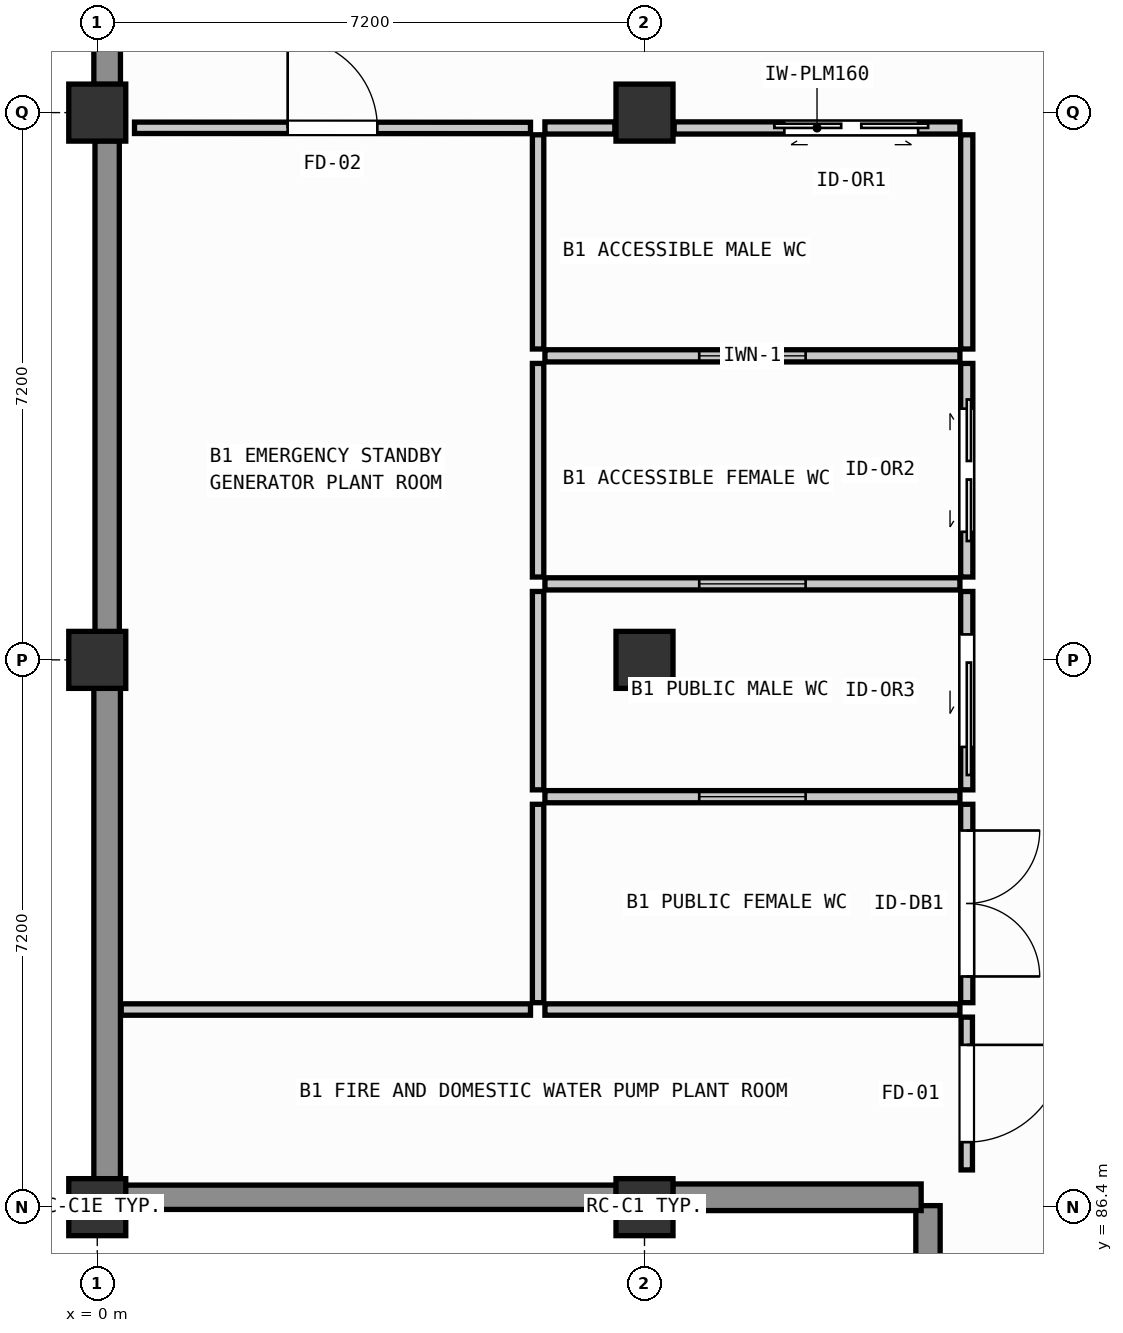
"""IFC4 building model, lengths in metres.
Left out: names, types, materials, properties, quantities, classifications, styles, units other than length and angle.
Written with IfcOpenShell. Run it as: python <this file> out.ifc"""

import sys

from ifc_helpers import new_model, si_unit, direction, frame, frame_2d, origin, origin_2d, place, context, subcontext, project, spatial, rectangle, extrude, element, fill, save


model = new_model("IFC4")
c1 = context("Model", 3, precision=1e-05, world=origin(), true_north=direction((0.0, 1.0)))
c2 = subcontext(c1, "Body", "Model", "MODEL_VIEW")
j1 = project(units=[si_unit("LENGTHUNIT", "METRE"), si_unit("PLANEANGLEUNIT", "RADIAN")], contexts=[c1])
p1 = place(None, origin())
s1 = spatial("IfcSite", under=j1, at=p1, CompositionType="ELEMENT")
p2 = place(p1, origin())
s2 = spatial("IfcBuilding", under=s1, at=p2, CompositionType="ELEMENT")
p3 = place(p2, frame((0.0, 0.0, -4.5)))
s3 = spatial("IfcBuildingStorey", under=s2, at=p3, CompositionType="ELEMENT", Elevation=-4.5)
for number, where, z_axis, x_axis in (
    (1, (0.0, 86.4, -0.5), (0.0, 0.0, 1.0), (1.0, 0.0, 0.0)),
    (2, (0.0, 93.6, -0.5), (0.0, 0.0, 1.0), (1.0, 0.0, 0.0)),
    (3, (0.0, 100.8, -0.5), (0.0, 0.0, 1.0), (1.0, 0.0, 0.0)),
    (4, (7.2, 86.4, -0.5), (0.0, 0.0, 1.0), (1.0, 0.0, 0.0)),
    (5, (7.2, 93.6, -0.5), (0.0, 0.0, 1.0), (1.0, 0.0, 0.0)),
    (6, (7.2, 100.8, -0.5), (0.0, 0.0, 1.0), (1.0, 0.0, 0.0)),
):
    element("IfcColumn", number, at=place(p3, frame(where, z_axis=z_axis, x_axis=x_axis)), inside=s3, PredefinedType="COLUMN", context=c2, shape_type="SweptSolid", body=[
        extrude(rectangle(XDim=0.75, YDim=0.75, at=origin_2d()), origin(), (0.0, 0.0, 1.0), 4.75),
    ])
p4 = place(p3, frame((10.93, 84.18, 0.0), z_axis=(0.0, 0.0, 1.0), x_axis=(0.0, 1.0, 0.0)))
e7 = element("IfcWall", 7, at=p4, inside=s3, PredefinedType="SOLIDWALL", context=c2, shape_type="SweptSolid", body=[
    extrude(rectangle(XDim=2.24, YDim=0.32, at=frame_2d((1.12, 0.0))), origin(), (0.0, 0.0, 1.0), 4.25),
])
p5 = place(p3, frame((10.84, 86.53, 0.0), z_axis=(0.0, 0.0, 1.0), x_axis=(-1.0, 0.0, 0.0)))
e8 = element("IfcWall", 8, at=p5, inside=s3, PredefinedType="SOLIDWALL", context=c2, shape_type="SweptSolid", body=[
    extrude(rectangle(XDim=3.27, YDim=0.35, at=frame_2d((1.635, 0.0))), origin(), (0.0, 0.0, 1.0), 4.25),
])
p6 = place(p3, frame((6.83, 86.53, 0.0), z_axis=(0.0, 0.0, 1.0), x_axis=(-1.0, 0.0, 0.0)))
e9 = element("IfcWall", 9, at=p6, inside=s3, PredefinedType="SOLIDWALL", context=c2, shape_type="SweptSolid", body=[
    extrude(rectangle(XDim=6.46, YDim=0.32, at=frame_2d((3.23, 0.0))), origin(), (0.0, 0.0, 1.0), 4.25),
])
p7 = place(p3, frame((0.13, 86.77, 0.0), z_axis=(0.0, 0.0, 1.0), x_axis=(0.0, 1.0, 0.0)))
e10 = element("IfcWall", 10, at=p7, inside=s3, PredefinedType="SOLIDWALL", context=c2, shape_type="SweptSolid", body=[
    extrude(rectangle(XDim=6.46, YDim=0.35, at=frame_2d((3.23, 0.0))), origin(), (0.0, 0.0, 1.0), 4.25),
])
p8 = place(p3, frame((0.13, 93.97, 0.0), z_axis=(0.0, 0.0, 1.0), x_axis=(0.0, 1.0, 0.0)))
e11 = element("IfcWall", 11, at=p8, inside=s3, PredefinedType="SOLIDWALL", context=c2, shape_type="SweptSolid", body=[
    extrude(rectangle(XDim=6.46, YDim=0.32, at=frame_2d((3.23, 0.0))), origin(), (0.0, 0.0, 1.0), 4.25),
])
p9 = place(p3, frame((0.13, 101.17, 0.0), z_axis=(0.0, 0.0, 1.0), x_axis=(0.0, 1.0, 0.0)))
e12 = element("IfcWall", 12, at=p9, inside=s3, PredefinedType="SOLIDWALL", context=c2, shape_type="SweptSolid", body=[
    extrude(rectangle(XDim=6.46, YDim=0.35, at=frame_2d((3.23, 0.0))), origin(), (0.0, 0.0, 1.0), 4.25),
])
p10 = place(p3, frame((5.89, 100.598, 0.0), z_axis=(0.0, 0.0, 1.0), x_axis=(1.0, 0.0, 0.0)))
e13 = element("IfcWall", 13, at=p10, inside=s3, PredefinedType="PLUMBINGWALL", context=c2, shape_type="SweptSolid", body=[
    extrude(rectangle(XDim=0.92, YDim=0.16, at=frame_2d((0.46, 0.0))), origin(), (0.0, 0.0, 1.0), 3.4),
])
p11 = place(p3, frame((7.59, 100.598, 0.0), z_axis=(0.0, 0.0, 1.0), x_axis=(1.0, 0.0, 0.0)))
e14 = element("IfcWall", 14, at=p11, inside=s3, PredefinedType="PLUMBINGWALL", context=c2, shape_type="SweptSolid", body=[
    extrude(rectangle(XDim=3.76, YDim=0.16, at=frame_2d((1.88, 0.0))), origin(), (0.0, 0.0, 1.0), 3.4),
])
p12 = place(p11, frame((1.45, 0.0, 0.0)))
e15 = element("IfcOpeningElement", 15, at=p12, cuts=e14, PredefinedType="OPENING", context=c2, shape_type="SweptSolid", body=[
    extrude(rectangle(XDim=1.76, YDim=2.38, at=frame_2d((0.88, 1.19))), frame((0.0, 0.09, 0.0), z_axis=(0.0, -1.0, 0.0), x_axis=(1.0, 0.0, 0.0)), (0.0, 0.0, 1.0), 0.18),
])
p13 = place(p3, frame((11.44, 100.508, 0.0), z_axis=(0.0, 0.0, 1.0), x_axis=(0.0, -1.0, 0.0)))
e16 = element("IfcWall", 16, at=p13, inside=s3, PredefinedType="PLUMBINGWALL", context=c2, shape_type="SweptSolid", body=[
    extrude(rectangle(XDim=2.818, YDim=0.16, at=frame_2d((1.409, 0.0))), origin(), (0.0, 0.0, 1.0), 3.4),
])
p14 = place(p3, frame((11.35, 97.6, 0.0), z_axis=(0.0, 0.0, 1.0), x_axis=(-1.0, 0.0, 0.0)))
e17 = element("IfcWall", 17, at=p14, inside=s3, PredefinedType="PLUMBINGWALL", context=c2, shape_type="SweptSolid", body=[
    extrude(rectangle(XDim=5.46, YDim=0.16, at=frame_2d((2.73, 0.0))), origin(), (0.0, 0.0, 1.0), 3.55),
])
p15 = place(p14, frame((2.03, 0.0, 1.15)))
e18 = element("IfcOpeningElement", 18, at=p15, cuts=e17, PredefinedType="OPENING", context=c2, shape_type="SweptSolid", body=[
    extrude(rectangle(XDim=1.4, YDim=1.05, at=frame_2d((0.7, 0.525))), frame((0.0, 0.09, 0.0), z_axis=(0.0, -1.0, 0.0), x_axis=(1.0, 0.0, 0.0)), (0.0, 0.0, 1.0), 0.18),
])
p16 = place(p3, frame((5.8, 97.69, 0.0), z_axis=(0.0, 0.0, 1.0), x_axis=(0.0, 1.0, 0.0)))
e19 = element("IfcWall", 19, at=p16, inside=s3, PredefinedType="PARTITIONING", context=c2, shape_type="SweptSolid", body=[
    extrude(rectangle(XDim=2.818, YDim=0.15, at=frame_2d((1.409, 0.0))), origin(), (0.0, 0.0, 1.0), 3.4),
])
p17 = place(p3, frame((11.44, 97.5, 0.0), z_axis=(0.0, 0.0, 1.0), x_axis=(0.0, -1.0, 0.0)))
e20 = element("IfcWall", 20, at=p17, inside=s3, PredefinedType="PLUMBINGWALL", context=c2, shape_type="SweptSolid", body=[
    extrude(rectangle(XDim=2.81, YDim=0.16, at=frame_2d((1.405, 0.0))), origin(), (0.0, 0.0, 1.0), 4.27),
])
p18 = place(p17, frame((0.595, 0.0, 0.0)))
e21 = element("IfcOpeningElement", 21, at=p18, cuts=e20, PredefinedType="OPENING", context=c2, shape_type="SweptSolid", body=[
    extrude(rectangle(XDim=1.62, YDim=2.34, at=frame_2d((0.81, 1.17))), frame((0.0, 0.09, 0.0), z_axis=(0.0, -1.0, 0.0), x_axis=(1.0, 0.0, 0.0)), (0.0, 0.0, 1.0), 0.18),
])
p19 = place(p3, frame((11.35, 94.6, 0.0), z_axis=(0.0, 0.0, 1.0), x_axis=(-1.0, 0.0, 0.0)))
e22 = element("IfcWall", 22, at=p19, inside=s3, PredefinedType="PLUMBINGWALL", context=c2, shape_type="SweptSolid", body=[
    extrude(rectangle(XDim=5.46, YDim=0.16, at=frame_2d((2.73, 0.0))), origin(), (0.0, 0.0, 1.0), 3.55),
])
p20 = place(p19, frame((2.03, 0.0, 1.15)))
e23 = element("IfcOpeningElement", 23, at=p20, cuts=e22, PredefinedType="OPENING", context=c2, shape_type="SweptSolid", body=[
    extrude(rectangle(XDim=1.4, YDim=1.05, at=frame_2d((0.7, 0.525))), frame((0.0, 0.09, 0.0), z_axis=(0.0, -1.0, 0.0), x_axis=(1.0, 0.0, 0.0)), (0.0, 0.0, 1.0), 0.18),
])
p21 = place(p3, frame((5.8, 94.69, 0.0), z_axis=(0.0, 0.0, 1.0), x_axis=(0.0, 1.0, 0.0)))
e24 = element("IfcWall", 24, at=p21, inside=s3, PredefinedType="PARTITIONING", context=c2, shape_type="SweptSolid", body=[
    extrude(rectangle(XDim=2.81, YDim=0.15, at=frame_2d((1.405, 0.0))), origin(), (0.0, 0.0, 1.0), 4.27),
])
p22 = place(p3, frame((11.44, 94.5, 0.0), z_axis=(0.0, 0.0, 1.0), x_axis=(0.0, -1.0, 0.0)))
e25 = element("IfcWall", 25, at=p22, inside=s3, PredefinedType="PLUMBINGWALL", context=c2, shape_type="SweptSolid", body=[
    extrude(rectangle(XDim=2.61, YDim=0.16, at=frame_2d((1.305, 0.0))), origin(), (0.0, 0.0, 1.0), 3.4),
])
p23 = place(p22, frame((0.565, 0.0, 0.0)))
e26 = element("IfcOpeningElement", 26, at=p23, cuts=e25, PredefinedType="OPENING", context=c2, shape_type="SweptSolid", body=[
    extrude(rectangle(XDim=1.48, YDim=2.3, at=frame_2d((0.74, 1.15))), frame((0.0, 0.09, 0.0), z_axis=(0.0, -1.0, 0.0), x_axis=(1.0, 0.0, 0.0)), (0.0, 0.0, 1.0), 0.18),
])
p24 = place(p3, frame((11.35, 91.8, 0.0), z_axis=(0.0, 0.0, 1.0), x_axis=(-1.0, 0.0, 0.0)))
e27 = element("IfcWall", 27, at=p24, inside=s3, PredefinedType="PLUMBINGWALL", context=c2, shape_type="SweptSolid", body=[
    extrude(rectangle(XDim=5.46, YDim=0.16, at=frame_2d((2.73, 0.0))), origin(), (0.0, 0.0, 1.0), 3.55),
])
p25 = place(p24, frame((2.03, 0.0, 1.15)))
e28 = element("IfcOpeningElement", 28, at=p25, cuts=e27, PredefinedType="OPENING", context=c2, shape_type="SweptSolid", body=[
    extrude(rectangle(XDim=1.4, YDim=1.05, at=frame_2d((0.7, 0.525))), frame((0.0, 0.09, 0.0), z_axis=(0.0, -1.0, 0.0), x_axis=(1.0, 0.0, 0.0)), (0.0, 0.0, 1.0), 0.18),
])
p26 = place(p3, frame((5.8, 91.89, 0.0), z_axis=(0.0, 0.0, 1.0), x_axis=(0.0, 1.0, 0.0)))
e29 = element("IfcWall", 29, at=p26, inside=s3, PredefinedType="PARTITIONING", context=c2, shape_type="SweptSolid", body=[
    extrude(rectangle(XDim=2.61, YDim=0.15, at=frame_2d((1.305, 0.0))), origin(), (0.0, 0.0, 1.0), 3.4),
])
p27 = place(p3, frame((11.44, 91.7, 0.0), z_axis=(0.0, 0.0, 1.0), x_axis=(0.0, -1.0, 0.0)))
e30 = element("IfcWall", 30, at=p27, inside=s3, PredefinedType="PLUMBINGWALL", context=c2, shape_type="SweptSolid", body=[
    extrude(rectangle(XDim=2.61, YDim=0.16, at=frame_2d((1.305, 0.0))), origin(), (0.0, 0.0, 1.0), 4.27),
])
p28 = place(p27, frame((0.345, 0.0, 0.0)))
e31 = element("IfcOpeningElement", 31, at=p28, cuts=e30, PredefinedType="OPENING", context=c2, shape_type="SweptSolid", body=[
    extrude(rectangle(XDim=1.92, YDim=2.36, at=frame_2d((0.96, 1.18))), frame((0.0, 0.09, 0.0), z_axis=(0.0, -1.0, 0.0), x_axis=(1.0, 0.0, 0.0)), (0.0, 0.0, 1.0), 0.18),
])
p29 = place(p3, frame((11.35, 89.0, 0.0), z_axis=(0.0, 0.0, 1.0), x_axis=(-1.0, 0.0, 0.0)))
e32 = element("IfcWall", 32, at=p29, inside=s3, PredefinedType="PARTITIONING", context=c2, shape_type="SweptSolid", body=[
    extrude(rectangle(XDim=5.46, YDim=0.15, at=frame_2d((2.73, 0.0))), origin(), (0.0, 0.0, 1.0), 3.55),
])
p30 = place(p3, frame((5.8, 89.09, 0.0), z_axis=(0.0, 0.0, 1.0), x_axis=(0.0, 1.0, 0.0)))
e33 = element("IfcWall", 33, at=p30, inside=s3, PredefinedType="PARTITIONING", context=c2, shape_type="SweptSolid", body=[
    extrude(rectangle(XDim=2.61, YDim=0.15, at=frame_2d((1.305, 0.0))), origin(), (0.0, 0.0, 1.0), 4.27),
])
p31 = place(p3, frame((11.44, 88.9, 0.0), z_axis=(0.0, 0.0, 1.0), x_axis=(0.0, -1.0, 0.0)))
e34 = element("IfcWall", 34, at=p31, inside=s3, PredefinedType="PARTITIONING", context=c2, shape_type="SweptSolid", body=[
    extrude(rectangle(XDim=2.01, YDim=0.15, at=frame_2d((1.005, 0.0))), origin(), (0.0, 0.0, 1.0), 4.27),
])
p32 = place(p31, frame((0.365, 0.0, 0.0)))
e35 = element("IfcOpeningElement", 35, at=p32, cuts=e34, PredefinedType="OPENING", context=c2, shape_type="SweptSolid", body=[
    extrude(rectangle(XDim=1.28, YDim=2.18, at=frame_2d((0.64, 1.09))), frame((0.0, 0.085, 0.0), z_axis=(0.0, -1.0, 0.0), x_axis=(1.0, 0.0, 0.0)), (0.0, 0.0, 1.0), 0.17),
])
p33 = place(p3, frame((0.49, 100.6, 0.0), z_axis=(0.0, 0.0, 1.0), x_axis=(0.999999911066, -0.000421743168, 0.0)))
e36 = element("IfcWall", 36, at=p33, inside=s3, PredefinedType="PARTITIONING", context=c2, shape_type="SweptSolid", body=[
    extrude(rectangle(XDim=5.21, YDim=0.15, at=frame_2d((2.605, 0.0))), origin(), (0.0, 0.0, 1.0), 3.4),
])
p34 = place(p33, frame((2.015, 0.0, 0.0)))
e37 = element("IfcOpeningElement", 37, at=p34, cuts=e36, PredefinedType="OPENING", context=c2, shape_type="SweptSolid", body=[
    extrude(rectangle(XDim=1.18, YDim=2.16, at=frame_2d((0.59, 1.08))), frame((0.0, 0.085, 0.0), z_axis=(0.0, -1.0, 0.0), x_axis=(1.0, 0.0, 0.0)), (0.0, 0.0, 1.0), 0.17),
])
p35 = place(p3, frame((5.7, 89.0, 0.0), z_axis=(0.0, 0.0, 1.0), x_axis=(-1.0, 0.0, 0.0)))
e38 = element("IfcWall", 38, at=p35, inside=s3, PredefinedType="PARTITIONING", context=c2, shape_type="SweptSolid", body=[
    extrude(rectangle(XDim=5.385, YDim=0.15, at=frame_2d((2.692, 0.0))), origin(), (0.0, 0.0, 1.0), 3.55),
])
p36 = place(p12, origin())
e39 = element("IfcDoor", 39, at=p36, inside=s3, OperationType="DOUBLE_DOOR_SLIDING", PredefinedType="DOOR", context=c2, shape_type="SweptSolid", body=[
    extrude(rectangle(XDim=1.76, YDim=2.38, at=frame_2d((0.88, 1.19))), frame((0.0, 0.025, 0.0), z_axis=(0.0, -1.0, 0.0), x_axis=(1.0, 0.0, 0.0)), (0.0, 0.0, 1.0), 0.05),
])
fill(e15, e39)
p37 = place(p15, origin())
e40 = element("IfcWindow", 40, at=p37, inside=s3, PartitioningType="SINGLE_PANEL", PredefinedType="WINDOW", context=c2, shape_type="SweptSolid", body=[
    extrude(rectangle(XDim=1.4, YDim=1.05, at=frame_2d((0.7, 0.525))), frame((0.0, 0.03, 0.0), z_axis=(0.0, -1.0, 0.0), x_axis=(1.0, 0.0, 0.0)), (0.0, 0.0, 1.0), 0.06),
])
fill(e18, e40)
p38 = place(p18, origin())
e41 = element("IfcDoor", 41, at=p38, inside=s3, OperationType="DOUBLE_DOOR_SLIDING", PredefinedType="DOOR", context=c2, shape_type="SweptSolid", body=[
    extrude(rectangle(XDim=1.62, YDim=2.34, at=frame_2d((0.81, 1.17))), frame((0.0, 0.025, 0.0), z_axis=(0.0, -1.0, 0.0), x_axis=(1.0, 0.0, 0.0)), (0.0, 0.0, 1.0), 0.05),
])
fill(e21, e41)
p39 = place(p20, origin())
e42 = element("IfcWindow", 42, at=p39, inside=s3, PartitioningType="SINGLE_PANEL", PredefinedType="WINDOW", context=c2, shape_type="SweptSolid", body=[
    extrude(rectangle(XDim=1.4, YDim=1.05, at=frame_2d((0.7, 0.525))), frame((0.0, 0.03, 0.0), z_axis=(0.0, -1.0, 0.0), x_axis=(1.0, 0.0, 0.0)), (0.0, 0.0, 1.0), 0.06),
])
fill(e23, e42)
p40 = place(p23, origin())
e43 = element("IfcDoor", 43, at=p40, inside=s3, OperationType="SLIDING_TO_RIGHT", PredefinedType="DOOR", context=c2, shape_type="SweptSolid", body=[
    extrude(rectangle(XDim=1.48, YDim=2.3, at=frame_2d((0.74, 1.15))), frame((0.0, 0.025, 0.0), z_axis=(0.0, -1.0, 0.0), x_axis=(1.0, 0.0, 0.0)), (0.0, 0.0, 1.0), 0.05),
])
fill(e26, e43)
p41 = place(p25, origin())
e44 = element("IfcWindow", 44, at=p41, inside=s3, PartitioningType="SINGLE_PANEL", PredefinedType="WINDOW", context=c2, shape_type="SweptSolid", body=[
    extrude(rectangle(XDim=1.4, YDim=1.05, at=frame_2d((0.7, 0.525))), frame((0.0, 0.03, 0.0), z_axis=(0.0, -1.0, 0.0), x_axis=(1.0, 0.0, 0.0)), (0.0, 0.0, 1.0), 0.06),
])
fill(e28, e44)
p42 = place(p28, origin())
e45 = element("IfcDoor", 45, at=p42, inside=s3, OperationType="DOUBLE_DOOR_SINGLE_SWING", PredefinedType="DOOR", context=c2, shape_type="SweptSolid", body=[
    extrude(rectangle(XDim=1.92, YDim=2.36, at=frame_2d((0.96, 1.18))), frame((0.0, 0.025, 0.0), z_axis=(0.0, -1.0, 0.0), x_axis=(1.0, 0.0, 0.0)), (0.0, 0.0, 1.0), 0.05),
])
fill(e31, e45)
p43 = place(p32, origin())
e46 = element("IfcDoor", 46, at=p43, inside=s3, OperationType="SINGLE_SWING_RIGHT", PredefinedType="DOOR", context=c2, shape_type="SweptSolid", body=[
    extrude(rectangle(XDim=1.28, YDim=2.18, at=frame_2d((0.64, 1.09))), frame((0.0, 0.025, 0.0), z_axis=(0.0, -1.0, 0.0), x_axis=(1.0, 0.0, 0.0)), (0.0, 0.0, 1.0), 0.05),
])
fill(e35, e46)
p44 = place(p34, origin())
e47 = element("IfcDoor", 47, at=p44, inside=s3, OperationType="SINGLE_SWING_LEFT", PredefinedType="DOOR", context=c2, shape_type="SweptSolid", body=[
    extrude(rectangle(XDim=1.18, YDim=2.16, at=frame_2d((0.59, 1.08))), frame((0.0, 0.025, 0.0), z_axis=(0.0, -1.0, 0.0), x_axis=(1.0, 0.0, 0.0)), (0.0, 0.0, 1.0), 0.05),
])
fill(e37, e47)
save(model, sys.argv[1])
